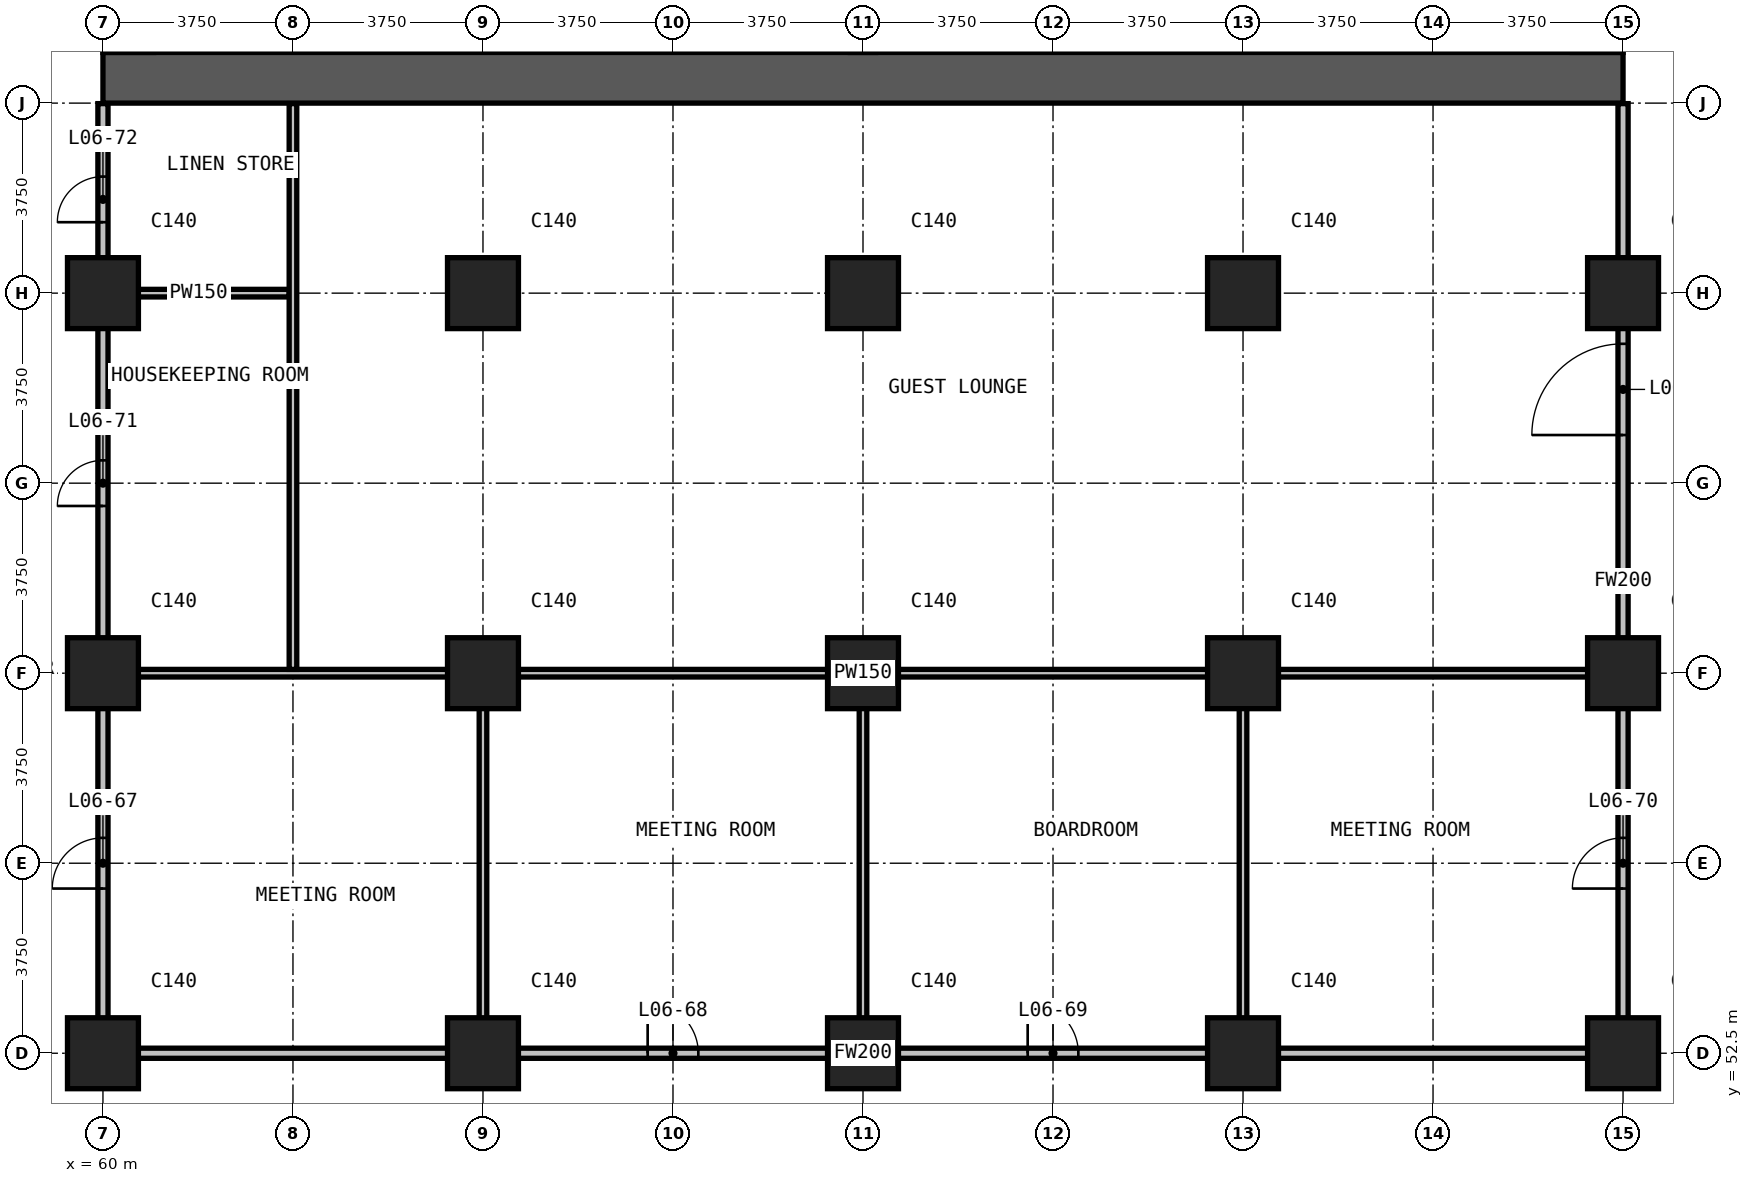
"""IFC4 building model, lengths in metres.
Left out: names, types, materials, properties, quantities, classifications, styles, units other than length and angle.
Written with IfcOpenShell. Run it as: python <this file> out.ifc"""

import sys

from ifc_helpers import new_model, si_unit, direction, frame, frame_2d, origin, origin_2d, place, context, subcontext, project, spatial, rectangle, extrude, element, fill, save


model = new_model("IFC4")
c1 = context("Model", 3, precision=1e-05, world=origin(), true_north=direction((0.0, 1.0)))
c2 = subcontext(c1, "Body", "Model", "MODEL_VIEW")
j1 = project(units=[si_unit("LENGTHUNIT", "METRE"), si_unit("PLANEANGLEUNIT", "RADIAN")], contexts=[c1])
p1 = place(None, origin())
s1 = spatial("IfcSite", under=j1, at=p1, CompositionType="ELEMENT")
p2 = place(p1, origin())
s2 = spatial("IfcBuilding", under=s1, at=p2, CompositionType="ELEMENT")
p3 = place(p2, frame((0.0, 0.0, 39.5)))
s3 = spatial("IfcBuildingStorey", under=s2, at=p3, CompositionType="ELEMENT", Elevation=39.5)
for number, where, z_axis, x_axis in (
    (1, (60.0, 52.5, 0.0), (0.0, 0.0, 1.0), (1.0, 0.0, 0.0)),
    (2, (60.0, 60.0, 0.0), (0.0, 0.0, 1.0), (1.0, 0.0, 0.0)),
    (3, (60.0, 67.5, 0.0), (0.0, 0.0, 1.0), (1.0, 0.0, 0.0)),
    (4, (67.5, 52.5, 0.0), (0.0, 0.0, 1.0), (1.0, 0.0, 0.0)),
    (5, (67.5, 60.0, 0.0), (0.0, 0.0, 1.0), (1.0, 0.0, 0.0)),
    (6, (67.5, 67.5, 0.0), (0.0, 0.0, 1.0), (1.0, 0.0, 0.0)),
    (7, (75.0, 52.5, 0.0), (0.0, 0.0, 1.0), (1.0, 0.0, 0.0)),
    (8, (75.0, 60.0, 0.0), (0.0, 0.0, 1.0), (1.0, 0.0, 0.0)),
    (9, (75.0, 67.5, 0.0), (0.0, 0.0, 1.0), (1.0, 0.0, 0.0)),
    (10, (82.5, 52.5, 0.0), (0.0, 0.0, 1.0), (1.0, 0.0, 0.0)),
    (11, (82.5, 60.0, 0.0), (0.0, 0.0, 1.0), (1.0, 0.0, 0.0)),
    (12, (82.5, 67.5, 0.0), (0.0, 0.0, 1.0), (1.0, 0.0, 0.0)),
    (13, (90.0, 52.5, 0.0), (0.0, 0.0, 1.0), (1.0, 0.0, 0.0)),
    (14, (90.0, 60.0, 0.0), (0.0, 0.0, 1.0), (1.0, 0.0, 0.0)),
    (15, (90.0, 67.5, 0.0), (0.0, 0.0, 1.0), (1.0, 0.0, 0.0)),
):
    element("IfcColumn", number, at=place(p3, frame(where, z_axis=z_axis, x_axis=x_axis)), inside=s3, PredefinedType="COLUMN", context=c2, shape_type="SweptSolid", body=[
        extrude(rectangle(XDim=1.4, YDim=1.4, at=origin_2d()), origin(), (0.0, 0.0, 1.0), 3.3),
    ])
p4 = place(p3, frame((60.0, 71.75, 0.0), z_axis=(0.0, 0.0, 1.0), x_axis=(1.0, 0.0, 0.0)))
e16 = element("IfcWall", 16, at=p4, inside=s3, PredefinedType="SHEAR", context=c2, shape_type="SweptSolid", body=[
    extrude(rectangle(XDim=30.0, YDim=1.0, at=frame_2d((15.0, 0.0))), origin(), (0.0, 0.0, 1.0), 3.3),
])
p5 = place(p3, frame((60.1, 52.5, 0.0), z_axis=(0.0, 0.0, 1.0), x_axis=(1.0, 0.0, 0.0)))
e17 = element("IfcWall", 17, at=p5, inside=s3, PredefinedType="PARTITIONING", context=c2, shape_type="SweptSolid", body=[
    extrude(rectangle(XDim=29.8, YDim=0.2, at=frame_2d((14.9, 0.0))), origin(), (0.0, 0.0, 1.0), 3.0),
])
p6 = place(p5, frame((10.65, 0.0, 0.0)))
e18 = element("IfcOpeningElement", 18, at=p6, cuts=e17, PredefinedType="OPENING", context=c2, shape_type="SweptSolid", body=[
    extrude(rectangle(XDim=1.0, YDim=2.2, at=frame_2d((0.5, 1.1))), frame((0.0, 0.11, 0.0), z_axis=(0.0, -1.0, 0.0), x_axis=(1.0, 0.0, 0.0)), (0.0, 0.0, 1.0), 0.22),
])
p7 = place(p5, frame((18.15, 0.0, 0.0)))
e19 = element("IfcOpeningElement", 19, at=p7, cuts=e17, PredefinedType="OPENING", context=c2, shape_type="SweptSolid", body=[
    extrude(rectangle(XDim=1.0, YDim=2.2, at=frame_2d((0.5, 1.1))), frame((0.0, 0.11, 0.0), z_axis=(0.0, -1.0, 0.0), x_axis=(1.0, 0.0, 0.0)), (0.0, 0.0, 1.0), 0.22),
])
p8 = place(p3, frame((60.0, 52.4, 0.0), z_axis=(0.0, 0.0, 1.0), x_axis=(0.0, 1.0, 0.0)))
e20 = element("IfcWall", 20, at=p8, inside=s3, PredefinedType="PARTITIONING", context=c2, shape_type="SweptSolid", body=[
    extrude(rectangle(XDim=18.84, YDim=0.2, at=frame_2d((9.42, 0.0))), origin(), (0.0, 0.0, 1.0), 3.0),
])
p9 = place(p8, frame((3.35, 0.0, 0.0)))
e21 = element("IfcOpeningElement", 21, at=p9, cuts=e20, PredefinedType="OPENING", context=c2, shape_type="SweptSolid", body=[
    extrude(rectangle(XDim=1.0, YDim=2.2, at=frame_2d((0.5, 1.1))), frame((0.0, 0.11, 0.0), z_axis=(0.0, -1.0, 0.0), x_axis=(1.0, 0.0, 0.0)), (0.0, 0.0, 1.0), 0.22),
])
p10 = place(p8, frame((10.9, 0.0, 0.0)))
e22 = element("IfcOpeningElement", 22, at=p10, cuts=e20, PredefinedType="OPENING", context=c2, shape_type="SweptSolid", body=[
    extrude(rectangle(XDim=0.9, YDim=2.2, at=frame_2d((0.45, 1.1))), frame((0.0, 0.11, 0.0), z_axis=(0.0, -1.0, 0.0), x_axis=(1.0, 0.0, 0.0)), (0.0, 0.0, 1.0), 0.22),
])
p11 = place(p8, frame((16.5, 0.0, 0.0)))
e23 = element("IfcOpeningElement", 23, at=p11, cuts=e20, PredefinedType="OPENING", context=c2, shape_type="SweptSolid", body=[
    extrude(rectangle(XDim=0.9, YDim=2.2, at=frame_2d((0.45, 1.1))), frame((0.0, 0.11, 0.0), z_axis=(0.0, -1.0, 0.0), x_axis=(1.0, 0.0, 0.0)), (0.0, 0.0, 1.0), 0.22),
])
p12 = place(p3, frame((90.0, 52.4, 0.0), z_axis=(0.0, 0.0, 1.0), x_axis=(0.0, 1.0, 0.0)))
e24 = element("IfcWall", 24, at=p12, inside=s3, PredefinedType="PARTITIONING", context=c2, shape_type="SweptSolid", body=[
    extrude(rectangle(XDim=18.84, YDim=0.2, at=frame_2d((9.42, 0.0))), origin(), (0.0, 0.0, 1.0), 3.0),
])
p13 = place(p12, frame((3.35, 0.0, 0.0)))
e25 = element("IfcOpeningElement", 25, at=p13, cuts=e24, PredefinedType="OPENING", context=c2, shape_type="SweptSolid", body=[
    extrude(rectangle(XDim=1.0, YDim=2.2, at=frame_2d((0.5, 1.1))), frame((0.0, 0.11, 0.0), z_axis=(0.0, -1.0, 0.0), x_axis=(1.0, 0.0, 0.0)), (0.0, 0.0, 1.0), 0.22),
])
p14 = place(p12, frame((12.3, 0.0, 0.0)))
e26 = element("IfcOpeningElement", 26, at=p14, cuts=e24, PredefinedType="OPENING", context=c2, shape_type="SweptSolid", body=[
    extrude(rectangle(XDim=1.8, YDim=2.2, at=frame_2d((0.9, 1.1))), frame((0.0, 0.11, 0.0), z_axis=(0.0, -1.0, 0.0), x_axis=(1.0, 0.0, 0.0)), (0.0, 0.0, 1.0), 0.22),
])
p15 = place(p3, frame((60.1, 60.0, 0.0), z_axis=(0.0, 0.0, 1.0), x_axis=(1.0, 0.0, 0.0)))
e27 = element("IfcWall", 27, at=p15, inside=s3, PredefinedType="PARTITIONING", context=c2, shape_type="SweptSolid", body=[
    extrude(rectangle(XDim=29.8, YDim=0.15, at=frame_2d((14.9, 0.0))), origin(), (0.0, 0.0, 1.0), 3.0),
])
p16 = place(p3, frame((60.1, 67.5, 0.0), z_axis=(0.0, 0.0, 1.0), x_axis=(1.0, 0.0, 0.0)))
e28 = element("IfcWall", 28, at=p16, inside=s3, PredefinedType="PARTITIONING", context=c2, shape_type="SweptSolid", body=[
    extrude(rectangle(XDim=3.575, YDim=0.15, at=frame_2d((1.788, 0.0))), origin(), (0.0, 0.0, 1.0), 3.0),
])
p17 = place(p3, frame((63.75, 60.075, 0.0), z_axis=(0.0, 0.0, 1.0), x_axis=(0.0, 1.0, 0.0)))
e29 = element("IfcWall", 29, at=p17, inside=s3, PredefinedType="PARTITIONING", context=c2, shape_type="SweptSolid", body=[
    extrude(rectangle(XDim=11.165, YDim=0.15, at=frame_2d((5.583, 0.0))), origin(), (0.0, 0.0, 1.0), 3.0),
])
for number, where, z_axis, x_axis in (
    (30, (67.5, 52.6, 0.0), (0.0, 0.0, 1.0), (0.0, 1.0, 0.0)),
    (31, (75.0, 52.6, 0.0), (0.0, 0.0, 1.0), (0.0, 1.0, 0.0)),
    (32, (82.5, 52.6, 0.0), (0.0, 0.0, 1.0), (0.0, 1.0, 0.0)),
):
    element("IfcWall", number, at=place(p3, frame(where, z_axis=z_axis, x_axis=x_axis)), inside=s3, PredefinedType="PARTITIONING", context=c2, shape_type="SweptSolid", body=[
        extrude(rectangle(XDim=7.325, YDim=0.15, at=frame_2d((3.663, 0.0))), origin(), (0.0, 0.0, 1.0), 3.0),
    ])
p18 = place(p9, origin())
e33 = element("IfcDoor", 33, at=p18, inside=s3, OperationType="SINGLE_SWING_RIGHT", PredefinedType="DOOR", context=c2, shape_type="SweptSolid", body=[
    extrude(rectangle(XDim=1.0, YDim=2.2, at=frame_2d((0.5, 1.1))), frame((0.0, 0.025, 0.0), z_axis=(0.0, -1.0, 0.0), x_axis=(1.0, 0.0, 0.0)), (0.0, 0.0, 1.0), 0.05),
])
fill(e21, e33)
p19 = place(p6, origin())
e34 = element("IfcDoor", 34, at=p19, inside=s3, OperationType="SINGLE_SWING_LEFT", PredefinedType="DOOR", context=c2, shape_type="SweptSolid", body=[
    extrude(rectangle(XDim=1.0, YDim=2.2, at=frame_2d((0.5, 1.1))), frame((0.0, 0.025, 0.0), z_axis=(0.0, -1.0, 0.0), x_axis=(1.0, 0.0, 0.0)), (0.0, 0.0, 1.0), 0.05),
])
fill(e18, e34)
p20 = place(p7, origin())
e35 = element("IfcDoor", 35, at=p20, inside=s3, OperationType="SINGLE_SWING_LEFT", PredefinedType="DOOR", context=c2, shape_type="SweptSolid", body=[
    extrude(rectangle(XDim=1.0, YDim=2.2, at=frame_2d((0.5, 1.1))), frame((0.0, 0.025, 0.0), z_axis=(0.0, -1.0, 0.0), x_axis=(1.0, 0.0, 0.0)), (0.0, 0.0, 1.0), 0.05),
])
fill(e19, e35)
p21 = place(p13, origin())
e36 = element("IfcDoor", 36, at=p21, inside=s3, OperationType="SINGLE_SWING_LEFT", PredefinedType="DOOR", context=c2, shape_type="SweptSolid", body=[
    extrude(rectangle(XDim=1.0, YDim=2.2, at=frame_2d((0.5, 1.1))), frame((0.0, 0.025, 0.0), z_axis=(0.0, -1.0, 0.0), x_axis=(1.0, 0.0, 0.0)), (0.0, 0.0, 1.0), 0.05),
])
fill(e25, e36)
p22 = place(p10, origin())
e37 = element("IfcDoor", 37, at=p22, inside=s3, OperationType="SINGLE_SWING_LEFT", PredefinedType="DOOR", context=c2, shape_type="SweptSolid", body=[
    extrude(rectangle(XDim=0.9, YDim=2.2, at=frame_2d((0.45, 1.1))), frame((0.0, 0.025, 0.0), z_axis=(0.0, -1.0, 0.0), x_axis=(1.0, 0.0, 0.0)), (0.0, 0.0, 1.0), 0.05),
])
fill(e22, e37)
p23 = place(p11, origin())
e38 = element("IfcDoor", 38, at=p23, inside=s3, OperationType="SINGLE_SWING_RIGHT", PredefinedType="DOOR", context=c2, shape_type="SweptSolid", body=[
    extrude(rectangle(XDim=0.9, YDim=2.2, at=frame_2d((0.45, 1.1))), frame((0.0, 0.025, 0.0), z_axis=(0.0, -1.0, 0.0), x_axis=(1.0, 0.0, 0.0)), (0.0, 0.0, 1.0), 0.05),
])
fill(e23, e38)
p24 = place(p14, origin())
e39 = element("IfcDoor", 39, at=p24, inside=s3, OperationType="DOUBLE_DOOR_SINGLE_SWING", PredefinedType="DOOR", context=c2, shape_type="SweptSolid", body=[
    extrude(rectangle(XDim=1.8, YDim=2.2, at=frame_2d((0.9, 1.1))), frame((0.0, 0.025, 0.0), z_axis=(0.0, -1.0, 0.0), x_axis=(1.0, 0.0, 0.0)), (0.0, 0.0, 1.0), 0.05),
])
fill(e26, e39)
save(model, sys.argv[1])
